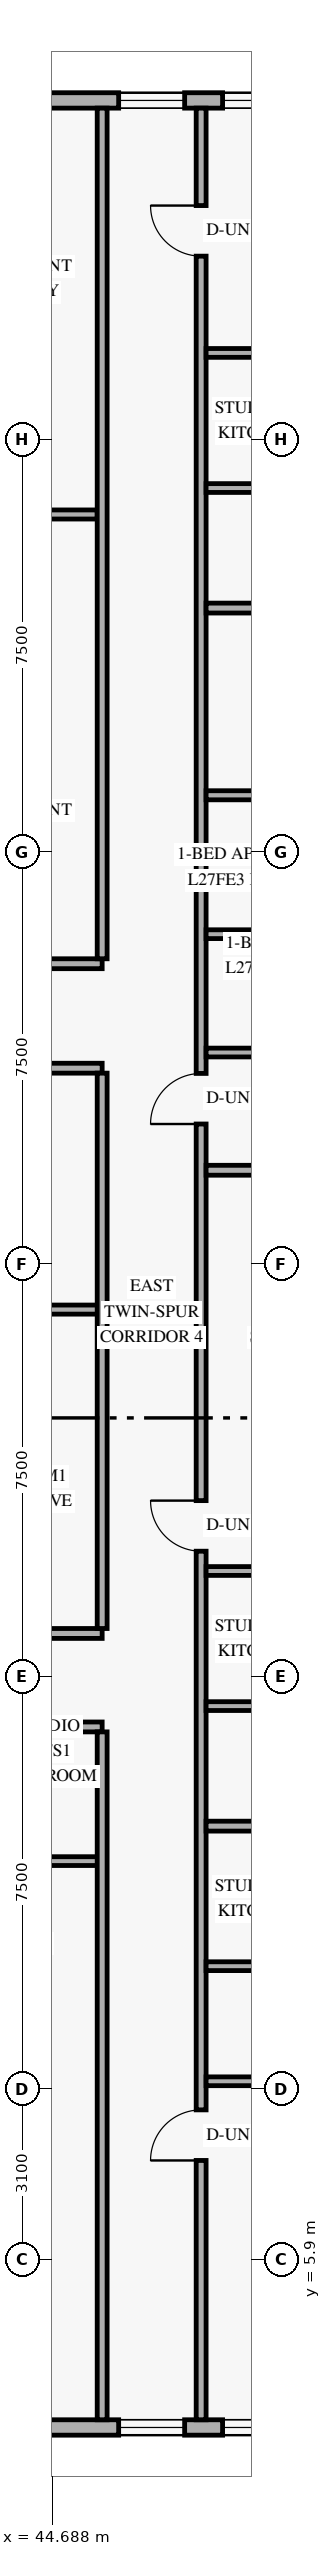
"""IFC4 building model, lengths in metres.
Left out: names, types, materials, properties, quantities, classifications, styles, units other than length and angle.
Written with IfcOpenShell. Run it as: python <this file> out.ifc"""

import sys

from ifc_helpers import new_model, si_unit, direction, frame, frame_2d, origin, place, context, subcontext, project, spatial, rectangle, extrude, element, fill, save


model = new_model("IFC4")
c1 = context("Model", 3, precision=1e-05, world=origin(), true_north=direction((0.0, 1.0)))
c2 = subcontext(c1, "Body", "Model", "MODEL_VIEW")
j1 = project(units=[si_unit("LENGTHUNIT", "METRE"), si_unit("PLANEANGLEUNIT", "RADIAN")], contexts=[c1])
p1 = place(None, origin())
s1 = spatial("IfcSite", under=j1, at=p1, CompositionType="ELEMENT")
p2 = place(p1, origin())
s2 = spatial("IfcBuilding", under=s1, at=p2, CompositionType="ELEMENT")
p3 = place(p2, frame((0.0, 0.0, 106.2)))
s3 = spatial("IfcBuildingStorey", under=s2, at=p3, CompositionType="ELEMENT", Elevation=106.2)
p4 = place(p3, frame((13.42, 2.84, 0.0), z_axis=(0.0, 0.0, 1.0), x_axis=(1.0, 0.0, 0.0)))
e1 = element("IfcWall", 1, at=p4, inside=s3, PredefinedType="SOLIDWALL", context=c2, shape_type="SweptSolid", body=[
    extrude(rectangle(XDim=36.56, YDim=0.28, at=frame_2d((18.28, 0.0))), origin(), (0.0, 0.0, 1.0), 3.36),
])
p5 = place(p4, frame((3.215, 0.0, 0.85)))
e2 = element("IfcOpeningElement", 2, at=p5, cuts=e1, PredefinedType="OPENING", context=c2, shape_type="SweptSolid", body=[
    extrude(rectangle(XDim=1.8, YDim=1.6, at=frame_2d((0.9, 0.8))), frame((0.0, 0.15, 0.0), z_axis=(0.0, -1.0, 0.0), x_axis=(1.0, 0.0, 0.0)), (0.0, 0.0, 1.0), 0.3),
])
p6 = place(p4, frame((10.055, 0.0, 0.85)))
e3 = element("IfcOpeningElement", 3, at=p6, cuts=e1, PredefinedType="OPENING", context=c2, shape_type="SweptSolid", body=[
    extrude(rectangle(XDim=1.8, YDim=1.6, at=frame_2d((0.9, 0.8))), frame((0.0, 0.15, 0.0), z_axis=(0.0, -1.0, 0.0), x_axis=(1.0, 0.0, 0.0)), (0.0, 0.0, 1.0), 0.3),
])
p7 = place(p4, frame((16.94, 0.0, 0.85)))
e4 = element("IfcOpeningElement", 4, at=p7, cuts=e1, PredefinedType="OPENING", context=c2, shape_type="SweptSolid", body=[
    extrude(rectangle(XDim=1.8, YDim=1.6, at=frame_2d((0.9, 0.8))), frame((0.0, 0.15, 0.0), z_axis=(0.0, -1.0, 0.0), x_axis=(1.0, 0.0, 0.0)), (0.0, 0.0, 1.0), 0.3),
])
p8 = place(p4, frame((22.365, 0.0, 0.85)))
e5 = element("IfcOpeningElement", 5, at=p8, cuts=e1, PredefinedType="OPENING", context=c2, shape_type="SweptSolid", body=[
    extrude(rectangle(XDim=1.8, YDim=1.6, at=frame_2d((0.9, 0.8))), frame((0.0, 0.15, 0.0), z_axis=(0.0, -1.0, 0.0), x_axis=(1.0, 0.0, 0.0)), (0.0, 0.0, 1.0), 0.3),
])
p9 = place(p4, frame((27.455, 0.0, 0.85)))
e6 = element("IfcOpeningElement", 6, at=p9, cuts=e1, PredefinedType="OPENING", context=c2, shape_type="SweptSolid", body=[
    extrude(rectangle(XDim=1.8, YDim=1.6, at=frame_2d((0.9, 0.8))), frame((0.0, 0.15, 0.0), z_axis=(0.0, -1.0, 0.0), x_axis=(1.0, 0.0, 0.0)), (0.0, 0.0, 1.0), 0.3),
])
p10 = place(p4, frame((32.48, 0.0, 0.85)))
e7 = element("IfcOpeningElement", 7, at=p10, cuts=e1, PredefinedType="OPENING", context=c2, shape_type="SweptSolid", body=[
    extrude(rectangle(XDim=1.2, YDim=1.5, at=frame_2d((0.6, 0.75))), frame((0.0, 0.15, 0.0), z_axis=(0.0, -1.0, 0.0), x_axis=(1.0, 0.0, 0.0)), (0.0, 0.0, 1.0), 0.3),
])
p11 = place(p4, frame((34.37, 0.0, 0.85)))
e8 = element("IfcOpeningElement", 8, at=p11, cuts=e1, PredefinedType="OPENING", context=c2, shape_type="SweptSolid", body=[
    extrude(rectangle(XDim=1.8, YDim=1.6, at=frame_2d((0.9, 0.8))), frame((0.0, 0.15, 0.0), z_axis=(0.0, -1.0, 0.0), x_axis=(1.0, 0.0, 0.0)), (0.0, 0.0, 1.0), 0.3),
])
p12 = place(p3, frame((49.98, 45.16, 0.0), z_axis=(0.0, 0.0, 1.0), x_axis=(-1.0, 0.0, 0.0)))
e9 = element("IfcWall", 9, at=p12, inside=s3, PredefinedType="SOLIDWALL", context=c2, shape_type="SweptSolid", body=[
    extrude(rectangle(XDim=36.56, YDim=0.28, at=frame_2d((18.28, 0.0))), origin(), (0.0, 0.0, 1.0), 3.36),
])
p13 = place(p12, frame((30.915, 0.0, 0.85)))
e10 = element("IfcOpeningElement", 10, at=p13, cuts=e9, PredefinedType="OPENING", context=c2, shape_type="SweptSolid", body=[
    extrude(rectangle(XDim=1.8, YDim=1.6, at=frame_2d((0.9, 0.8))), frame((0.0, 0.15, 0.0), z_axis=(0.0, -1.0, 0.0), x_axis=(1.0, 0.0, 0.0)), (0.0, 0.0, 1.0), 0.3),
])
p14 = place(p12, frame((23.055, 0.0, 0.85)))
e11 = element("IfcOpeningElement", 11, at=p14, cuts=e9, PredefinedType="OPENING", context=c2, shape_type="SweptSolid", body=[
    extrude(rectangle(XDim=1.8, YDim=1.6, at=frame_2d((0.9, 0.8))), frame((0.0, 0.15, 0.0), z_axis=(0.0, -1.0, 0.0), x_axis=(1.0, 0.0, 0.0)), (0.0, 0.0, 1.0), 0.3),
])
p15 = place(p12, frame((16.17, 0.0, 0.85)))
e12 = element("IfcOpeningElement", 12, at=p15, cuts=e9, PredefinedType="OPENING", context=c2, shape_type="SweptSolid", body=[
    extrude(rectangle(XDim=1.8, YDim=1.6, at=frame_2d((0.9, 0.8))), frame((0.0, 0.15, 0.0), z_axis=(0.0, -1.0, 0.0), x_axis=(1.0, 0.0, 0.0)), (0.0, 0.0, 1.0), 0.3),
])
p16 = place(p12, frame((10.565, 0.0, 0.85)))
e13 = element("IfcOpeningElement", 13, at=p16, cuts=e9, PredefinedType="OPENING", context=c2, shape_type="SweptSolid", body=[
    extrude(rectangle(XDim=1.8, YDim=1.6, at=frame_2d((0.9, 0.8))), frame((0.0, 0.15, 0.0), z_axis=(0.0, -1.0, 0.0), x_axis=(1.0, 0.0, 0.0)), (0.0, 0.0, 1.0), 0.3),
])
p17 = place(p12, frame((5.475, 0.0, 0.85)))
e14 = element("IfcOpeningElement", 14, at=p17, cuts=e9, PredefinedType="OPENING", context=c2, shape_type="SweptSolid", body=[
    extrude(rectangle(XDim=1.8, YDim=1.6, at=frame_2d((0.9, 0.8))), frame((0.0, 0.15, 0.0), z_axis=(0.0, -1.0, 0.0), x_axis=(1.0, 0.0, 0.0)), (0.0, 0.0, 1.0), 0.3),
])
p18 = place(p12, frame((2.88, 0.0, 0.85)))
e15 = element("IfcOpeningElement", 15, at=p18, cuts=e9, PredefinedType="OPENING", context=c2, shape_type="SweptSolid", body=[
    extrude(rectangle(XDim=1.2, YDim=1.5, at=frame_2d((0.6, 0.75))), frame((0.0, 0.15, 0.0), z_axis=(0.0, -1.0, 0.0), x_axis=(1.0, 0.0, 0.0)), (0.0, 0.0, 1.0), 0.3),
])
p19 = place(p12, frame((0.39, 0.0, 0.85)))
e16 = element("IfcOpeningElement", 16, at=p19, cuts=e9, PredefinedType="OPENING", context=c2, shape_type="SweptSolid", body=[
    extrude(rectangle(XDim=1.8, YDim=1.6, at=frame_2d((0.9, 0.8))), frame((0.0, 0.15, 0.0), z_axis=(0.0, -1.0, 0.0), x_axis=(1.0, 0.0, 0.0)), (0.0, 0.0, 1.0), 0.3),
])
p20 = place(p3, frame((38.032, 15.58, 0.0), z_axis=(0.0, 0.0, 1.0), x_axis=(1.0, 0.0, 0.0)))
e17 = element("IfcWall", 17, at=p20, inside=s3, PredefinedType="STANDARD", context=c2, shape_type="SweptSolid", body=[
    extrude(rectangle(XDim=7.568, YDim=0.18, at=frame_2d((3.784, 0.0))), origin(), (0.0, 0.0, 1.0), 2.731),
])
p21 = place(p20, frame((0.357, 0.0, 0.0)))
e18 = element("IfcOpeningElement", 18, at=p21, cuts=e17, PredefinedType="OPENING", context=c2, shape_type="SweptSolid", body=[
    extrude(rectangle(XDim=0.92, YDim=2.15, at=frame_2d((0.46, 1.075))), frame((0.0, 0.1, 0.0), z_axis=(0.0, -1.0, 0.0), x_axis=(1.0, 0.0, 0.0)), (0.0, 0.0, 1.0), 0.2),
])
for number, where, z_axis, x_axis in (
    (19, (37.64, 17.28, 0.0), (0.0, 0.0, 1.0), (1.0, 0.0, 0.0)),
    (20, (37.64, 27.56, 0.0), (0.0, 0.0, 1.0), (1.0, 0.0, 0.0)),
):
    element("IfcWall", number, at=place(p3, frame(where, z_axis=z_axis, x_axis=x_axis)), inside=s3, PredefinedType="STANDARD", context=c2, shape_type="SweptSolid", body=[
        extrude(rectangle(XDim=7.96, YDim=0.18, at=frame_2d((3.98, 0.0))), origin(), (0.0, 0.0, 1.0), 2.731),
    ])
p22 = place(p3, frame((35.51, 29.46, 0.0), z_axis=(0.0, 0.0, 1.0), x_axis=(1.0, 0.0, 0.0)))
e21 = element("IfcWall", 21, at=p22, inside=s3, PredefinedType="STANDARD", context=c2, shape_type="SweptSolid", body=[
    extrude(rectangle(XDim=10.09, YDim=0.18, at=frame_2d((5.045, 0.0))), origin(), (0.0, 0.0, 1.0), 2.731),
])
p23 = place(p22, frame((0.32, 0.0, 0.0)))
e22 = element("IfcOpeningElement", 22, at=p23, cuts=e21, PredefinedType="OPENING", context=c2, shape_type="SweptSolid", body=[
    extrude(rectangle(XDim=0.92, YDim=2.15, at=frame_2d((0.46, 1.075))), frame((0.0, 0.1, 0.0), z_axis=(0.0, -1.0, 0.0), x_axis=(1.0, 0.0, 0.0)), (0.0, 0.0, 1.0), 0.2),
])
p24 = place(p3, frame((40.93, 13.14, 0.0), z_axis=(0.0, 0.0, 1.0), x_axis=(1.0, 0.0, 0.0)))
e23 = element("IfcWall", 23, at=p24, inside=s3, PredefinedType="PLUMBINGWALL", context=c2, shape_type="SweptSolid", body=[
    extrude(rectangle(XDim=4.67, YDim=0.16, at=frame_2d((2.335, 0.0))), origin(), (0.0, 0.0, 1.0), 2.731),
])
p25 = place(p24, frame((0.35, 0.0, 0.0)))
e24 = element("IfcOpeningElement", 24, at=p25, cuts=e23, PredefinedType="OPENING", context=c2, shape_type="SweptSolid", body=[
    extrude(rectangle(XDim=0.88, YDim=2.12, at=frame_2d((0.44, 1.06))), frame((0.0, 0.09, 0.0), z_axis=(0.0, -1.0, 0.0), x_axis=(1.0, 0.0, 0.0)), (0.0, 0.0, 1.0), 0.18),
])
p26 = place(p24, frame((2.72, 0.0, 0.0)))
e25 = element("IfcOpeningElement", 25, at=p26, cuts=e23, PredefinedType="OPENING", context=c2, shape_type="SweptSolid", body=[
    extrude(rectangle(XDim=0.86, YDim=2.12, at=frame_2d((0.43, 1.06))), frame((0.0, 0.09, 0.0), z_axis=(0.0, -1.0, 0.0), x_axis=(1.0, 0.0, 0.0)), (0.0, 0.0, 1.0), 0.18),
])
p27 = place(p3, frame((41.69, 37.63, 0.0), z_axis=(0.0, 0.0, 1.0), x_axis=(1.0, 0.0, 0.0)))
e26 = element("IfcWall", 26, at=p27, inside=s3, PredefinedType="PARTITIONING", context=c2, shape_type="SweptSolid", body=[
    extrude(rectangle(XDim=3.82, YDim=0.165, at=frame_2d((1.91, 0.0))), origin(), (0.0, 0.0, 1.0), 2.731),
])
p28 = place(p3, frame((42.038, 23.17, 0.0), z_axis=(0.0, 0.0, 1.0), x_axis=(1.0, 0.0, 0.0)))
e27 = element("IfcWall", 27, at=p28, inside=s3, PredefinedType="PARTITIONING", context=c2, shape_type="SweptSolid", body=[
    extrude(rectangle(XDim=3.922, YDim=0.165, at=frame_2d((1.961, 0.0))), origin(), (0.0, 0.0, 1.0), 2.731),
])
p29 = place(p28, frame((0.55, 0.0, 0.0)))
e28 = element("IfcOpeningElement", 28, at=p29, cuts=e27, PredefinedType="OPENING", context=c2, shape_type="SweptSolid", body=[
    extrude(rectangle(XDim=0.88, YDim=2.12, at=frame_2d((0.44, 1.06))), frame((0.0, 0.093, 0.0), z_axis=(0.0, -1.0, 0.0), x_axis=(1.0, 0.0, 0.0)), (0.0, 0.0, 1.0), 0.185),
])
p30 = place(p3, frame((47.4, 2.98, 0.0), z_axis=(0.0, 0.0, 1.0), x_axis=(0.0, 1.0, 0.0)))
e29 = element("IfcWall", 29, at=p30, inside=s3, PredefinedType="STANDARD", context=c2, shape_type="SweptSolid", body=[
    extrude(rectangle(XDim=42.04, YDim=0.18, at=frame_2d((21.02, 0.0))), origin(), (0.0, 0.0, 1.0), 2.731),
])
p31 = place(p30, frame((4.716, 0.0, 0.0)))
e30 = element("IfcOpeningElement", 30, at=p31, cuts=e29, PredefinedType="OPENING", context=c2, shape_type="SweptSolid", body=[
    extrude(rectangle(XDim=0.92, YDim=2.15, at=frame_2d((0.46, 1.075))), frame((0.0, 0.1, 0.0), z_axis=(0.0, -1.0, 0.0), x_axis=(1.0, 0.0, 0.0)), (0.0, 0.0, 1.0), 0.2),
])
p32 = place(p30, frame((15.796, 0.0, 0.0)))
e31 = element("IfcOpeningElement", 31, at=p32, cuts=e29, PredefinedType="OPENING", context=c2, shape_type="SweptSolid", body=[
    extrude(rectangle(XDim=0.92, YDim=2.15, at=frame_2d((0.46, 1.075))), frame((0.0, 0.1, 0.0), z_axis=(0.0, -1.0, 0.0), x_axis=(1.0, 0.0, 0.0)), (0.0, 0.0, 1.0), 0.2),
])
p33 = place(p30, frame((23.565, 0.0, 0.0)))
e32 = element("IfcOpeningElement", 32, at=p33, cuts=e29, PredefinedType="OPENING", context=c2, shape_type="SweptSolid", body=[
    extrude(rectangle(XDim=0.92, YDim=2.15, at=frame_2d((0.46, 1.075))), frame((0.0, 0.1, 0.0), z_axis=(0.0, -1.0, 0.0), x_axis=(1.0, 0.0, 0.0)), (0.0, 0.0, 1.0), 0.2),
])
p34 = place(p30, frame((39.348, 0.0, 0.0)))
e33 = element("IfcOpeningElement", 33, at=p34, cuts=e29, PredefinedType="OPENING", context=c2, shape_type="SweptSolid", body=[
    extrude(rectangle(XDim=0.92, YDim=2.15, at=frame_2d((0.46, 1.075))), frame((0.0, 0.1, 0.0), z_axis=(0.0, -1.0, 0.0), x_axis=(1.0, 0.0, 0.0)), (0.0, 0.0, 1.0), 0.2),
])
p35 = place(p3, frame((45.6, 2.98, 0.0), z_axis=(0.0, 0.0, 1.0), x_axis=(0.0, 1.0, 0.0)))
e34 = element("IfcWall", 34, at=p35, inside=s3, PredefinedType="STANDARD", context=c2, shape_type="SweptSolid", body=[
    extrude(rectangle(XDim=12.51, YDim=0.18, at=frame_2d((6.255, 0.0))), origin(), (0.0, 0.0, 1.0), 2.731),
])
p36 = place(p3, frame((45.6, 17.37, 0.0), z_axis=(0.0, 0.0, 1.0), x_axis=(0.0, 1.0, 0.0)))
e35 = element("IfcWall", 35, at=p36, inside=s3, PredefinedType="STANDARD", context=c2, shape_type="SweptSolid", body=[
    extrude(rectangle(XDim=10.1, YDim=0.18, at=frame_2d((5.05, 0.0))), origin(), (0.0, 0.0, 1.0), 2.731),
])
p37 = place(p3, frame((45.6, 29.55, 0.0), z_axis=(0.0, 0.0, 1.0), x_axis=(0.0, 1.0, 0.0)))
e36 = element("IfcWall", 36, at=p37, inside=s3, PredefinedType="STANDARD", context=c2, shape_type="SweptSolid", body=[
    extrude(rectangle(XDim=15.47, YDim=0.18, at=frame_2d((7.735, 0.0))), origin(), (0.0, 0.0, 1.0), 2.731),
])
p38 = place(p3, frame((47.49, 9.136, 0.0), z_axis=(0.0, 0.0, 1.0), x_axis=(1.0, 0.0, 0.0)))
e37 = element("IfcWall", 37, at=p38, inside=s3, PredefinedType="PLUMBINGWALL", context=c2, shape_type="SweptSolid", body=[
    extrude(rectangle(XDim=3.775, YDim=0.16, at=frame_2d((1.888, 0.0))), origin(), (0.0, 0.0, 1.0), 2.731),
])
p39 = place(p3, frame((47.49, 11.229, 0.0), z_axis=(0.0, 0.0, 1.0), x_axis=(1.0, 0.0, 0.0)))
e38 = element("IfcWall", 38, at=p39, inside=s3, PredefinedType="PLUMBINGWALL", context=c2, shape_type="SweptSolid", body=[
    extrude(rectangle(XDim=3.615, YDim=0.16, at=frame_2d((1.808, 0.0))), origin(), (0.0, 0.0, 1.0), 2.809),
])
p40 = place(p3, frame((47.49, 13.776, 0.0), z_axis=(0.0, 0.0, 1.0), x_axis=(1.0, 0.0, 0.0)))
e39 = element("IfcWall", 39, at=p40, inside=s3, PredefinedType="PARTITIONING", context=c2, shape_type="SweptSolid", body=[
    extrude(rectangle(XDim=5.83, YDim=0.18, at=frame_2d((2.915, 0.0))), origin(), (0.0, 0.0, 1.0), 2.809),
])
p41 = place(p3, frame((47.49, 18.416, 0.0), z_axis=(0.0, 0.0, 1.0), x_axis=(1.0, 0.0, 0.0)))
e40 = element("IfcWall", 40, at=p41, inside=s3, PredefinedType="PLUMBINGWALL", context=c2, shape_type="SweptSolid", body=[
    extrude(rectangle(XDim=3.775, YDim=0.16, at=frame_2d((1.888, 0.0))), origin(), (0.0, 0.0, 1.0), 2.809),
])
p42 = place(p3, frame((47.49, 15.959, 0.0), z_axis=(0.0, 0.0, 1.0), x_axis=(1.0, 0.0, 0.0)))
e41 = element("IfcWall", 41, at=p42, inside=s3, PredefinedType="PLUMBINGWALL", context=c2, shape_type="SweptSolid", body=[
    extrude(rectangle(XDim=3.615, YDim=0.16, at=frame_2d((1.808, 0.0))), origin(), (0.0, 0.0, 1.0), 2.809),
])
p43 = place(p3, frame((47.49, 25.704, 0.0), z_axis=(0.0, 0.0, 1.0), x_axis=(1.0, 0.0, 0.0)))
e42 = element("IfcWall", 42, at=p43, inside=s3, PredefinedType="PARTITIONING", context=c2, shape_type="SweptSolid", body=[
    extrude(rectangle(XDim=5.83, YDim=0.18, at=frame_2d((2.915, 0.0))), origin(), (0.0, 0.0, 1.0), 2.809),
])
p44 = place(p3, frame((47.49, 32.523, 0.0), z_axis=(0.0, 0.0, 1.0), x_axis=(1.0, 0.0, 0.0)))
e43 = element("IfcWall", 43, at=p44, inside=s3, PredefinedType="PARTITIONING", context=c2, shape_type="SweptSolid", body=[
    extrude(rectangle(XDim=5.83, YDim=0.165, at=frame_2d((2.915, 0.0))), origin(), (0.0, 0.0, 1.0), 2.809),
])
p45 = place(p44, frame((4.468, 0.0, 0.0)))
e44 = element("IfcOpeningElement", 44, at=p45, cuts=e43, PredefinedType="OPENING", context=c2, shape_type="SweptSolid", body=[
    extrude(rectangle(XDim=0.9, YDim=2.14, at=frame_2d((0.45, 1.07))), frame((0.0, 0.093, 0.0), z_axis=(0.0, -1.0, 0.0), x_axis=(1.0, 0.0, 0.0)), (0.0, 0.0, 1.0), 0.185),
])
p46 = place(p3, frame((47.49, 27.845, 0.0), z_axis=(0.0, 0.0, 1.0), x_axis=(1.0, 0.0, 0.0)))
e45 = element("IfcWall", 45, at=p46, inside=s3, PredefinedType="PLUMBINGWALL", context=c2, shape_type="SweptSolid", body=[
    extrude(rectangle(XDim=3.775, YDim=0.16, at=frame_2d((1.888, 0.0))), origin(), (0.0, 0.0, 1.0), 2.809),
])
p47 = place(p3, frame((47.49, 29.997, 0.0), z_axis=(0.0, 0.0, 1.0), x_axis=(1.0, 0.0, 0.0)))
e46 = element("IfcWall", 46, at=p47, inside=s3, PredefinedType="PLUMBINGWALL", context=c2, shape_type="SweptSolid", body=[
    extrude(rectangle(XDim=3.615, YDim=0.16, at=frame_2d((1.808, 0.0))), origin(), (0.0, 0.0, 1.0), 2.731),
])
p48 = place(p3, frame((47.49, 35.928, 0.0), z_axis=(0.0, 0.0, 1.0), x_axis=(1.0, 0.0, 0.0)))
e47 = element("IfcWall", 47, at=p48, inside=s3, PredefinedType="PARTITIONING", context=c2, shape_type="SweptSolid", body=[
    extrude(rectangle(XDim=5.83, YDim=0.18, at=frame_2d((2.915, 0.0))), origin(), (0.0, 0.0, 1.0), 2.809),
])
p49 = place(p3, frame((47.49, 40.568, 0.0), z_axis=(0.0, 0.0, 1.0), x_axis=(1.0, 0.0, 0.0)))
e48 = element("IfcWall", 48, at=p49, inside=s3, PredefinedType="PLUMBINGWALL", context=c2, shape_type="SweptSolid", body=[
    extrude(rectangle(XDim=3.775, YDim=0.16, at=frame_2d((1.888, 0.0))), origin(), (0.0, 0.0, 1.0), 2.809),
])
p50 = place(p3, frame((47.49, 38.111, 0.0), z_axis=(0.0, 0.0, 1.0), x_axis=(1.0, 0.0, 0.0)))
e49 = element("IfcWall", 49, at=p50, inside=s3, PredefinedType="PLUMBINGWALL", context=c2, shape_type="SweptSolid", body=[
    extrude(rectangle(XDim=3.615, YDim=0.16, at=frame_2d((1.808, 0.0))), origin(), (0.0, 0.0, 1.0), 2.809),
])
p51 = place(p10, origin())
e50 = element("IfcWindow", 50, at=p51, inside=s3, PartitioningType="SINGLE_PANEL", PredefinedType="WINDOW", context=c2, shape_type="SweptSolid", body=[
    extrude(rectangle(XDim=1.2, YDim=1.5, at=frame_2d((0.6, 0.75))), frame((0.0, 0.03, 0.0), z_axis=(0.0, -1.0, 0.0), x_axis=(1.0, 0.0, 0.0)), (0.0, 0.0, 1.0), 0.06),
])
fill(e7, e50)
p52 = place(p11, origin())
e51 = element("IfcWindow", 51, at=p52, inside=s3, PartitioningType="SINGLE_PANEL", PredefinedType="WINDOW", context=c2, shape_type="SweptSolid", body=[
    extrude(rectangle(XDim=1.8, YDim=1.6, at=frame_2d((0.9, 0.8))), frame((0.0, 0.03, 0.0), z_axis=(0.0, -1.0, 0.0), x_axis=(1.0, 0.0, 0.0)), (0.0, 0.0, 1.0), 0.06),
])
fill(e8, e51)
p53 = place(p18, origin())
e52 = element("IfcWindow", 52, at=p53, inside=s3, PartitioningType="SINGLE_PANEL", PredefinedType="WINDOW", context=c2, shape_type="SweptSolid", body=[
    extrude(rectangle(XDim=1.2, YDim=1.5, at=frame_2d((0.6, 0.75))), frame((0.0, 0.03, 0.0), z_axis=(0.0, -1.0, 0.0), x_axis=(1.0, 0.0, 0.0)), (0.0, 0.0, 1.0), 0.06),
])
fill(e15, e52)
p54 = place(p19, origin())
e53 = element("IfcWindow", 53, at=p54, inside=s3, PartitioningType="SINGLE_PANEL", PredefinedType="WINDOW", context=c2, shape_type="SweptSolid", body=[
    extrude(rectangle(XDim=1.8, YDim=1.6, at=frame_2d((0.9, 0.8))), frame((0.0, 0.03, 0.0), z_axis=(0.0, -1.0, 0.0), x_axis=(1.0, 0.0, 0.0)), (0.0, 0.0, 1.0), 0.06),
])
fill(e16, e53)
p55 = place(p31, origin())
e54 = element("IfcDoor", 54, at=p55, inside=s3, OperationType="SINGLE_SWING_LEFT", PredefinedType="DOOR", context=c2, shape_type="SweptSolid", body=[
    extrude(rectangle(XDim=0.92, YDim=2.15, at=frame_2d((0.46, 1.075))), frame((0.0, 0.025, 0.0), z_axis=(0.0, -1.0, 0.0), x_axis=(1.0, 0.0, 0.0)), (0.0, 0.0, 1.0), 0.05),
])
fill(e30, e54)
p56 = place(p32, origin())
e55 = element("IfcDoor", 55, at=p56, inside=s3, OperationType="SINGLE_SWING_RIGHT", PredefinedType="DOOR", context=c2, shape_type="SweptSolid", body=[
    extrude(rectangle(XDim=0.92, YDim=2.15, at=frame_2d((0.46, 1.075))), frame((0.0, 0.025, 0.0), z_axis=(0.0, -1.0, 0.0), x_axis=(1.0, 0.0, 0.0)), (0.0, 0.0, 1.0), 0.05),
])
fill(e31, e55)
p57 = place(p33, origin())
e56 = element("IfcDoor", 56, at=p57, inside=s3, OperationType="SINGLE_SWING_LEFT", PredefinedType="DOOR", context=c2, shape_type="SweptSolid", body=[
    extrude(rectangle(XDim=0.92, YDim=2.15, at=frame_2d((0.46, 1.075))), frame((0.0, 0.025, 0.0), z_axis=(0.0, -1.0, 0.0), x_axis=(1.0, 0.0, 0.0)), (0.0, 0.0, 1.0), 0.05),
])
fill(e32, e56)
p58 = place(p34, origin())
e57 = element("IfcDoor", 57, at=p58, inside=s3, OperationType="SINGLE_SWING_RIGHT", PredefinedType="DOOR", context=c2, shape_type="SweptSolid", body=[
    extrude(rectangle(XDim=0.92, YDim=2.15, at=frame_2d((0.46, 1.075))), frame((0.0, 0.025, 0.0), z_axis=(0.0, -1.0, 0.0), x_axis=(1.0, 0.0, 0.0)), (0.0, 0.0, 1.0), 0.05),
])
fill(e33, e57)
save(model, sys.argv[1])
